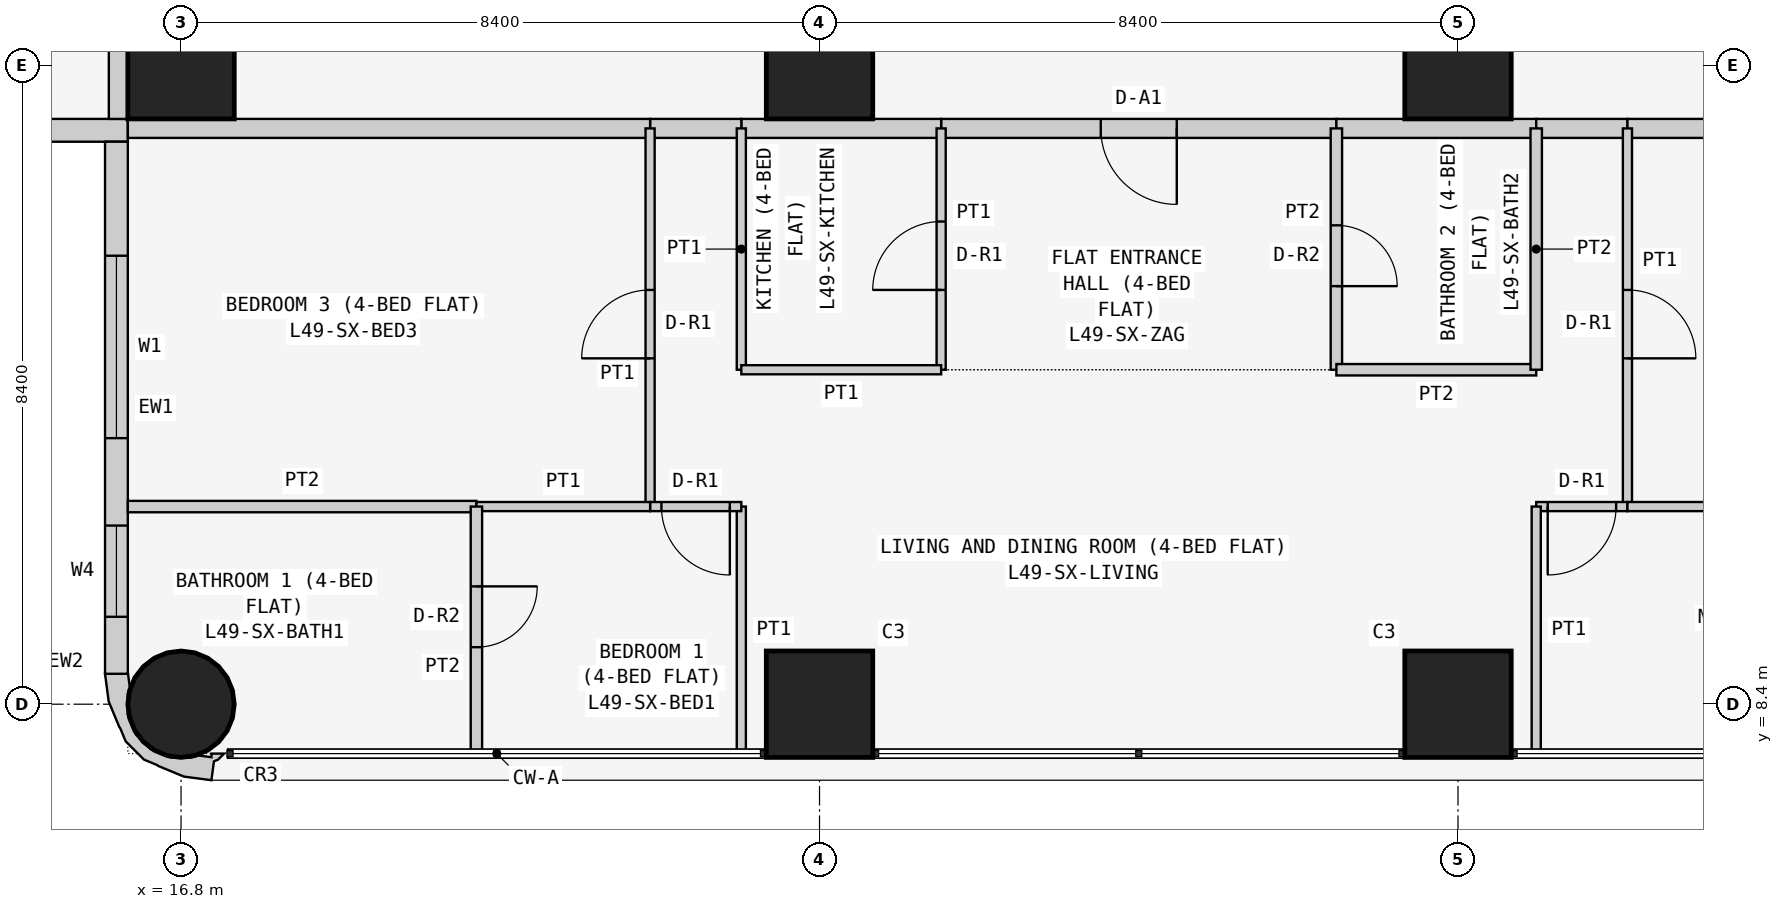
"""IFC4 building model, lengths in metres.
Left out: names, types, materials, properties, quantities, classifications, styles, units other than length and angle.
Written with IfcOpenShell. Run it as: python <this file> out.ifc"""

import sys

from ifc_helpers import new_model, si_unit, direction, frame, frame_2d, origin, origin_2d, place, context, subcontext, project, spatial, polyline, rectangle, circle, outline, extrude, element, fill, save


model = new_model("IFC4")
c1 = context("Model", 3, precision=1e-05, world=origin(), true_north=direction((0.0, 1.0)))
c2 = subcontext(c1, "Body", "Model", "MODEL_VIEW")
j1 = project(units=[si_unit("LENGTHUNIT", "METRE"), si_unit("PLANEANGLEUNIT", "RADIAN")], contexts=[c1])
p1 = place(None, origin())
s1 = spatial("IfcSite", under=j1, at=p1, CompositionType="ELEMENT")
p2 = place(p1, origin())
s2 = spatial("IfcBuilding", under=s1, at=p2, CompositionType="ELEMENT")
p3 = place(p2, frame((0.0, 0.0, 190.5)))
s3 = spatial("IfcBuildingStorey", under=s2, at=p3, CompositionType="ELEMENT", Elevation=190.5)
p4 = place(p3, frame((16.8, 8.4, 0.0), z_axis=(0.0, 0.0, 1.0), x_axis=(1.0, 0.0, 0.0)))
e1 = element("IfcColumn", 1, at=p4, inside=s3, PredefinedType="COLUMN", context=c2, shape_type="SweptSolid", body=[
    extrude(circle(Radius=0.7, at=origin_2d()), origin(), (0.0, 0.0, 1.0), 3.6),
])
for number, where, z_axis, x_axis in (
    (2, (16.8, 16.8, 0.0), (0.0, 0.0, 1.0), (1.0, 0.0, 0.0)),
    (3, (25.2, 8.4, 0.0), (0.0, 0.0, 1.0), (1.0, 0.0, 0.0)),
    (4, (25.2, 16.8, 0.0), (0.0, 0.0, 1.0), (1.0, 0.0, 0.0)),
    (5, (33.6, 8.4, 0.0), (0.0, 0.0, 1.0), (1.0, 0.0, 0.0)),
    (6, (33.6, 16.8, 0.0), (0.0, 0.0, 1.0), (1.0, 0.0, 0.0)),
):
    element("IfcColumn", number, at=place(p3, frame(where, z_axis=z_axis, x_axis=x_axis)), inside=s3, PredefinedType="COLUMN", context=c2, shape_type="SweptSolid", body=[
        extrude(rectangle(XDim=1.4, YDim=1.4, at=origin_2d()), origin(), (0.0, 0.0, 1.0), 3.6),
    ])
p5 = place(p3, frame((0.4, 15.95, 0.0), z_axis=(0.0, 0.0, 1.0), x_axis=(1.0, 0.0, 0.0)))
e7 = element("IfcWall", 7, at=p5, inside=s3, PredefinedType="SOLIDWALL", context=c2, shape_type="SweptSolid", body=[
    extrude(rectangle(XDim=15.7, YDim=0.3, at=frame_2d((7.85, 0.0))), origin(), (0.0, 0.0, 1.0), 3.45),
])
p6 = place(p5, frame((12.4, 0.0, 0.9)))
e8 = element("IfcOpeningElement", 8, at=p6, cuts=e7, PredefinedType="OPENING", context=c2, shape_type="SweptSolid", body=[
    extrude(rectangle(XDim=1.8, YDim=1.5, at=frame_2d((0.9, 0.75))), frame((0.0, 0.16, 0.0), z_axis=(0.0, -1.0, 0.0), x_axis=(1.0, 0.0, 0.0)), (0.0, 0.0, 1.0), 0.32),
])
p7 = place(p5, frame((9.55, 0.0, 1.5)))
e9 = element("IfcOpeningElement", 9, at=p7, cuts=e7, PredefinedType="OPENING", context=c2, shape_type="SweptSolid", body=[
    extrude(rectangle(XDim=0.9, YDim=0.7, at=frame_2d((0.45, 0.35))), frame((0.0, 0.16, 0.0), z_axis=(0.0, -1.0, 0.0), x_axis=(1.0, 0.0, 0.0)), (0.0, 0.0, 1.0), 0.32),
])
p8 = place(p5, frame((5.1, 0.0, 0.9)))
e10 = element("IfcOpeningElement", 10, at=p8, cuts=e7, PredefinedType="OPENING", context=c2, shape_type="SweptSolid", body=[
    extrude(rectangle(XDim=1.8, YDim=1.5, at=frame_2d((0.9, 0.75))), frame((0.0, 0.16, 0.0), z_axis=(0.0, -1.0, 0.0), x_axis=(1.0, 0.0, 0.0)), (0.0, 0.0, 1.0), 0.32),
])
p9 = place(p5, frame((2.0, 0.0, 0.0)))
e11 = element("IfcOpeningElement", 11, at=p9, cuts=e7, PredefinedType="OPENING", context=c2, shape_type="SweptSolid", body=[
    extrude(rectangle(XDim=0.9, YDim=2.4, at=frame_2d((0.45, 1.2))), frame((0.0, 0.16, 0.0), z_axis=(0.0, -1.0, 0.0), x_axis=(1.0, 0.0, 0.0)), (0.0, 0.0, 1.0), 0.32),
])
p10 = place(p5, frame((0.7, 0.0, 0.9)))
e12 = element("IfcOpeningElement", 12, at=p10, cuts=e7, PredefinedType="OPENING", context=c2, shape_type="SweptSolid", body=[
    extrude(rectangle(XDim=1.2, YDim=1.5, at=frame_2d((0.6, 0.75))), frame((0.0, 0.16, 0.0), z_axis=(0.0, -1.0, 0.0), x_axis=(1.0, 0.0, 0.0)), (0.0, 0.0, 1.0), 0.32),
])
p11 = place(p3, frame((15.95, 15.8, 0.0), z_axis=(0.0, 0.0, 1.0), x_axis=(0.0, -1.0, 0.0)))
e13 = element("IfcWall", 13, at=p11, inside=s3, PredefinedType="SOLIDWALL", context=c2, shape_type="SweptSolid", body=[
    extrude(rectangle(XDim=7.0, YDim=0.3, at=frame_2d((3.5, 0.0))), origin(), (0.0, 0.0, 1.0), 3.45),
])
p12 = place(p11, frame((1.5, 0.0, 0.9)))
e14 = element("IfcOpeningElement", 14, at=p12, cuts=e13, PredefinedType="OPENING", context=c2, shape_type="SweptSolid", body=[
    extrude(rectangle(XDim=2.4, YDim=1.5, at=frame_2d((1.2, 0.75))), frame((0.0, 0.16, 0.0), z_axis=(0.0, -1.0, 0.0), x_axis=(1.0, 0.0, 0.0)), (0.0, 0.0, 1.0), 0.32),
])
p13 = place(p11, frame((5.05, 0.0, 0.9)))
e15 = element("IfcOpeningElement", 15, at=p13, cuts=e13, PredefinedType="OPENING", context=c2, shape_type="SweptSolid", body=[
    extrude(rectangle(XDim=1.2, YDim=1.5, at=frame_2d((0.6, 0.75))), frame((0.0, 0.16, 0.0), z_axis=(0.0, -1.0, 0.0), x_axis=(1.0, 0.0, 0.0)), (0.0, 0.0, 1.0), 0.32),
])
p14 = place(p3, frame((16.076, 8.69, 0.0), z_axis=(0.0, 0.0, 1.0), x_axis=(-0.439933741929, -0.898030234854, 0.0)))
e16 = element("IfcWall", 16, at=p14, inside=s3, PredefinedType="SOLIDWALL", context=c2, shape_type="SweptSolid", body=[
    extrude(outline(polyline([(0.664, 1.577), (0.426, 1.497), (0.382, 1.536), (0.276, 1.572), (0.349, 1.423), (0.392, 1.444), (0.453, 1.261), (0.51, 1.211), (0.632, 0.961), (0.65, 0.683), (0.56, 0.419), (0.375, 0.21), (0.125, 0.087), (0.05, 0.082), (-0.127, -0.035), (-0.145, -0.044), (0.022, -0.296), (0.327, -0.094), (0.568, 0.18), (0.578, 0.199), (0.7, 0.337), (0.811, 0.661), (0.799, 0.846), (0.803, 0.866), (0.78, 1.231), (0.664, 1.577)])), origin(), (0.0, 0.0, 1.0), 3.45),
])
p15 = place(p3, frame((32.0, 15.975, 0.0), z_axis=(0.0, 0.0, 1.0), x_axis=(-1.0, 0.0, 0.0)))
e17 = element("IfcWall", 17, at=p15, inside=s3, PredefinedType="PARTITIONING", context=c2, shape_type="SweptSolid", body=[
    extrude(rectangle(XDim=5.2, YDim=0.25, at=frame_2d((2.6, 0.0))), origin(), (0.0, 0.0, 1.0), 3.45),
])
p16 = place(p15, frame((2.1, 0.0, 0.0)))
e18 = element("IfcOpeningElement", 18, at=p16, cuts=e17, PredefinedType="OPENING", context=c2, shape_type="SweptSolid", body=[
    extrude(rectangle(XDim=1.0, YDim=2.1, at=frame_2d((0.5, 1.05))), frame((0.0, 0.135, 0.0), z_axis=(0.0, -1.0, 0.0), x_axis=(1.0, 0.0, 0.0)), (0.0, 0.0, 1.0), 0.27),
])
p17 = place(p3, frame((34.629, 15.975, 0.0), z_axis=(0.0, 0.0, 1.0), x_axis=(-1.0, 0.0, 0.0)))
e19 = element("IfcWall", 19, at=p17, inside=s3, PredefinedType="PARTITIONING", context=c2, shape_type="SweptSolid", body=[
    extrude(rectangle(XDim=2.629, YDim=0.25, at=frame_2d((1.314, 0.0))), origin(), (0.0, 0.0, 1.0), 3.45),
])
p18 = place(p3, frame((26.8, 15.975, 0.0), z_axis=(0.0, 0.0, 1.0), x_axis=(-1.0, 0.0, 0.0)))
e20 = element("IfcWall", 20, at=p18, inside=s3, PredefinedType="PARTITIONING", context=c2, shape_type="SweptSolid", body=[
    extrude(rectangle(XDim=2.629, YDim=0.25, at=frame_2d((1.314, 0.0))), origin(), (0.0, 0.0, 1.0), 3.45),
])
p19 = place(p3, frame((24.171, 15.975, 0.0), z_axis=(0.0, 0.0, 1.0), x_axis=(-1.0, 0.0, 0.0)))
e21 = element("IfcWall", 21, at=p19, inside=s3, PredefinedType="PARTITIONING", context=c2, shape_type="SweptSolid", body=[
    extrude(rectangle(XDim=1.2, YDim=0.25, at=frame_2d((0.6, 0.0))), origin(), (0.0, 0.0, 1.0), 3.45),
])
p20 = place(p3, frame((35.829, 15.975, 0.0), z_axis=(0.0, 0.0, 1.0), x_axis=(-1.0, 0.0, 0.0)))
e22 = element("IfcWall", 22, at=p20, inside=s3, PredefinedType="PARTITIONING", context=c2, shape_type="SweptSolid", body=[
    extrude(rectangle(XDim=1.2, YDim=0.25, at=frame_2d((0.6, 0.0))), origin(), (0.0, 0.0, 1.0), 3.45),
])
for number, where, z_axis, x_axis in (
    (23, (42.7, 15.975, 0.0), (0.0, 0.0, 1.0), (-1.0, 0.0, 0.0)),
    (24, (22.971, 15.975, 0.0), (0.0, 0.0, 1.0), (-1.0, 0.0, 0.0)),
    (25, (15.975, 16.1, 0.0), (0.0, 0.0, 1.0), (0.0, 1.0, 0.0)),
):
    element("IfcWall", number, at=place(p3, frame(where, z_axis=z_axis, x_axis=x_axis)), inside=s3, PredefinedType="PARTITIONING", context=c2, shape_type="SweptSolid", body=[
        extrude(rectangle(XDim=6.871, YDim=0.25, at=frame_2d((3.436, 0.0))), origin(), (0.0, 0.0, 1.0), 3.45),
    ])
p21 = place(p3, frame((32.0, 12.8, 0.0), z_axis=(0.0, 0.0, 1.0), x_axis=(0.0, 1.0, 0.0)))
e26 = element("IfcWall", 26, at=p21, inside=s3, PredefinedType="PARTITIONING", context=c2, shape_type="SweptSolid", body=[
    extrude(rectangle(XDim=3.175, YDim=0.15, at=frame_2d((1.587, 0.0))), origin(), (0.0, 0.0, 1.0), 3.45),
])
p22 = place(p21, frame((1.1, 0.0, 0.0)))
e27 = element("IfcOpeningElement", 27, at=p22, cuts=e26, PredefinedType="OPENING", context=c2, shape_type="SweptSolid", body=[
    extrude(rectangle(XDim=0.8, YDim=2.1, at=frame_2d((0.4, 1.05))), frame((0.0, 0.085, 0.0), z_axis=(0.0, -1.0, 0.0), x_axis=(1.0, 0.0, 0.0)), (0.0, 0.0, 1.0), 0.17),
])
p23 = place(p3, frame((26.8, 15.975, 0.0), z_axis=(0.0, 0.0, 1.0), x_axis=(0.0, -1.0, 0.0)))
e28 = element("IfcWall", 28, at=p23, inside=s3, PredefinedType="PARTITIONING", context=c2, shape_type="SweptSolid", body=[
    extrude(rectangle(XDim=3.175, YDim=0.12, at=frame_2d((1.587, 0.0))), origin(), (0.0, 0.0, 1.0), 3.45),
])
p24 = place(p23, frame((1.225, 0.0, 0.0)))
e29 = element("IfcOpeningElement", 29, at=p24, cuts=e28, PredefinedType="OPENING", context=c2, shape_type="SweptSolid", body=[
    extrude(rectangle(XDim=0.9, YDim=2.1, at=frame_2d((0.45, 1.05))), frame((0.0, 0.07, 0.0), z_axis=(0.0, -1.0, 0.0), x_axis=(1.0, 0.0, 0.0)), (0.0, 0.0, 1.0), 0.14),
])
p25 = place(p3, frame((32.0, 12.8, 0.0), z_axis=(0.0, 0.0, 1.0), x_axis=(1.0, 0.0, 0.0)))
e30 = element("IfcWall", 30, at=p25, inside=s3, PredefinedType="PARTITIONING", context=c2, shape_type="SweptSolid", body=[
    extrude(rectangle(XDim=2.629, YDim=0.15, at=frame_2d((1.314, 0.0))), origin(), (0.0, 0.0, 1.0), 3.45),
])
p26 = place(p3, frame((34.629, 12.8, 0.0), z_axis=(0.0, 0.0, 1.0), x_axis=(0.0, 1.0, 0.0)))
e31 = element("IfcWall", 31, at=p26, inside=s3, PredefinedType="PARTITIONING", context=c2, shape_type="SweptSolid", body=[
    extrude(rectangle(XDim=3.175, YDim=0.15, at=frame_2d((1.587, 0.0))), origin(), (0.0, 0.0, 1.0), 3.45),
])
p27 = place(p3, frame((24.171, 15.975, 0.0), z_axis=(0.0, 0.0, 1.0), x_axis=(0.0, -1.0, 0.0)))
e32 = element("IfcWall", 32, at=p27, inside=s3, PredefinedType="PARTITIONING", context=c2, shape_type="SweptSolid", body=[
    extrude(rectangle(XDim=3.175, YDim=0.12, at=frame_2d((1.587, 0.0))), origin(), (0.0, 0.0, 1.0), 3.45),
])
p28 = place(p3, frame((24.171, 12.8, 0.0), z_axis=(0.0, 0.0, 1.0), x_axis=(1.0, 0.0, 0.0)))
e33 = element("IfcWall", 33, at=p28, inside=s3, PredefinedType="PARTITIONING", context=c2, shape_type="SweptSolid", body=[
    extrude(rectangle(XDim=2.629, YDim=0.12, at=frame_2d((1.314, 0.0))), origin(), (0.0, 0.0, 1.0), 3.45),
])
p29 = place(p3, frame((35.829, 15.975, 0.0), z_axis=(0.0, 0.0, 1.0), x_axis=(0.0, -1.0, 0.0)))
e34 = element("IfcWall", 34, at=p29, inside=s3, PredefinedType="PARTITIONING", context=c2, shape_type="SweptSolid", body=[
    extrude(rectangle(XDim=4.975, YDim=0.12, at=frame_2d((2.488, 0.0))), origin(), (0.0, 0.0, 1.0), 3.45),
])
p30 = place(p29, frame((2.125, 0.0, 0.0)))
e35 = element("IfcOpeningElement", 35, at=p30, cuts=e34, PredefinedType="OPENING", context=c2, shape_type="SweptSolid", body=[
    extrude(rectangle(XDim=0.9, YDim=2.1, at=frame_2d((0.45, 1.05))), frame((0.0, 0.07, 0.0), z_axis=(0.0, -1.0, 0.0), x_axis=(1.0, 0.0, 0.0)), (0.0, 0.0, 1.0), 0.14),
])
p31 = place(p3, frame((35.829, 11.0, 0.0), z_axis=(0.0, 0.0, 1.0), x_axis=(-1.0, 0.0, 0.0)))
e36 = element("IfcWall", 36, at=p31, inside=s3, PredefinedType="PARTITIONING", context=c2, shape_type="SweptSolid", body=[
    extrude(rectangle(XDim=1.2, YDim=0.12, at=frame_2d((0.6, 0.0))), origin(), (0.0, 0.0, 1.0), 3.45),
])
p32 = place(p31, frame((0.149, 0.0, 0.0)))
e37 = element("IfcOpeningElement", 37, at=p32, cuts=e36, PredefinedType="OPENING", context=c2, shape_type="SweptSolid", body=[
    extrude(rectangle(XDim=0.9, YDim=2.1, at=frame_2d((0.45, 1.05))), frame((0.0, 0.07, 0.0), z_axis=(0.0, -1.0, 0.0), x_axis=(1.0, 0.0, 0.0)), (0.0, 0.0, 1.0), 0.14),
])
p33 = place(p3, frame((34.629, 11.0, 0.0), z_axis=(0.0, 0.0, 1.0), x_axis=(0.0, -1.0, 0.0)))
e38 = element("IfcWall", 38, at=p33, inside=s3, PredefinedType="PARTITIONING", context=c2, shape_type="SweptSolid", body=[
    extrude(rectangle(XDim=3.25, YDim=0.12, at=frame_2d((1.625, 0.0))), origin(), (0.0, 0.0, 1.0), 3.45),
])
p34 = place(p3, frame((22.971, 11.0, 0.0), z_axis=(0.0, 0.0, 1.0), x_axis=(0.0, 1.0, 0.0)))
e39 = element("IfcWall", 39, at=p34, inside=s3, PredefinedType="PARTITIONING", context=c2, shape_type="SweptSolid", body=[
    extrude(rectangle(XDim=4.975, YDim=0.12, at=frame_2d((2.488, 0.0))), origin(), (0.0, 0.0, 1.0), 3.45),
])
p35 = place(p34, frame((1.95, 0.0, 0.0)))
e40 = element("IfcOpeningElement", 40, at=p35, cuts=e39, PredefinedType="OPENING", context=c2, shape_type="SweptSolid", body=[
    extrude(rectangle(XDim=0.9, YDim=2.1, at=frame_2d((0.45, 1.05))), frame((0.0, 0.07, 0.0), z_axis=(0.0, -1.0, 0.0), x_axis=(1.0, 0.0, 0.0)), (0.0, 0.0, 1.0), 0.14),
])
p36 = place(p3, frame((24.171, 7.75, 0.0), z_axis=(0.0, 0.0, 1.0), x_axis=(0.0, 1.0, 0.0)))
e41 = element("IfcWall", 41, at=p36, inside=s3, PredefinedType="PARTITIONING", context=c2, shape_type="SweptSolid", body=[
    extrude(rectangle(XDim=3.25, YDim=0.12, at=frame_2d((1.625, 0.0))), origin(), (0.0, 0.0, 1.0), 3.45),
])
p37 = place(p3, frame((24.171, 11.0, 0.0), z_axis=(0.0, 0.0, 1.0), x_axis=(-1.0, 0.0, 0.0)))
e42 = element("IfcWall", 42, at=p37, inside=s3, PredefinedType="PARTITIONING", context=c2, shape_type="SweptSolid", body=[
    extrude(rectangle(XDim=1.2, YDim=0.12, at=frame_2d((0.6, 0.0))), origin(), (0.0, 0.0, 1.0), 3.45),
])
p38 = place(p37, frame((0.151, 0.0, 0.0)))
e43 = element("IfcOpeningElement", 43, at=p38, cuts=e42, PredefinedType="OPENING", context=c2, shape_type="SweptSolid", body=[
    extrude(rectangle(XDim=0.9, YDim=2.1, at=frame_2d((0.45, 1.05))), frame((0.0, 0.07, 0.0), z_axis=(0.0, -1.0, 0.0), x_axis=(1.0, 0.0, 0.0)), (0.0, 0.0, 1.0), 0.14),
])
p39 = place(p3, frame((35.829, 11.0, 0.0), z_axis=(0.0, 0.0, 1.0), x_axis=(1.0, 0.0, 0.0)))
e44 = element("IfcWall", 44, at=p39, inside=s3, PredefinedType="PARTITIONING", context=c2, shape_type="SweptSolid", body=[
    extrude(rectangle(XDim=6.871, YDim=0.12, at=frame_2d((3.436, 0.0))), origin(), (0.0, 0.0, 1.0), 3.45),
])
p40 = place(p3, frame((16.1, 11.0, 0.0), z_axis=(0.0, 0.0, 1.0), x_axis=(1.0, 0.0, 0.0)))
e45 = element("IfcWall", 45, at=p40, inside=s3, PredefinedType="PARTITIONING", context=c2, shape_type="SweptSolid", body=[
    extrude(rectangle(XDim=4.586, YDim=0.15, at=frame_2d((2.293, 0.0))), origin(), (0.0, 0.0, 1.0), 3.45),
])
p41 = place(p3, frame((20.686, 11.0, 0.0), z_axis=(0.0, 0.0, 1.0), x_axis=(1.0, 0.0, 0.0)))
e46 = element("IfcWall", 46, at=p41, inside=s3, PredefinedType="PARTITIONING", context=c2, shape_type="SweptSolid", body=[
    extrude(rectangle(XDim=2.285, YDim=0.12, at=frame_2d((1.143, 0.0))), origin(), (0.0, 0.0, 1.0), 3.45),
])
p42 = place(p3, frame((20.686, 7.75, 0.0), z_axis=(0.0, 0.0, 1.0), x_axis=(0.0, 1.0, 0.0)))
e47 = element("IfcWall", 47, at=p42, inside=s3, PredefinedType="PARTITIONING", context=c2, shape_type="SweptSolid", body=[
    extrude(rectangle(XDim=3.25, YDim=0.15, at=frame_2d((1.625, 0.0))), origin(), (0.0, 0.0, 1.0), 3.45),
])
p43 = place(p42, frame((1.4, 0.0, 0.0)))
e48 = element("IfcOpeningElement", 48, at=p43, cuts=e47, PredefinedType="OPENING", context=c2, shape_type="SweptSolid", body=[
    extrude(rectangle(XDim=0.8, YDim=2.1, at=frame_2d((0.4, 1.05))), frame((0.0, 0.085, 0.0), z_axis=(0.0, -1.0, 0.0), x_axis=(1.0, 0.0, 0.0)), (0.0, 0.0, 1.0), 0.17),
])
p44 = place(p12, origin())
e49 = element("IfcWindow", 49, at=p44, inside=s3, PartitioningType="SINGLE_PANEL", PredefinedType="WINDOW", context=c2, shape_type="SweptSolid", body=[
    extrude(rectangle(XDim=2.4, YDim=1.5, at=frame_2d((1.2, 0.75))), frame((0.0, 0.03, 0.0), z_axis=(0.0, -1.0, 0.0), x_axis=(1.0, 0.0, 0.0)), (0.0, 0.0, 1.0), 0.06),
])
fill(e14, e49)
p45 = place(p13, origin())
e50 = element("IfcWindow", 50, at=p45, inside=s3, PartitioningType="SINGLE_PANEL", PredefinedType="WINDOW", context=c2, shape_type="SweptSolid", body=[
    extrude(rectangle(XDim=1.2, YDim=1.5, at=frame_2d((0.6, 0.75))), frame((0.0, 0.03, 0.0), z_axis=(0.0, -1.0, 0.0), x_axis=(1.0, 0.0, 0.0)), (0.0, 0.0, 1.0), 0.06),
])
fill(e15, e50)
p46 = place(p16, origin())
e51 = element("IfcDoor", 51, at=p46, inside=s3, OperationType="SINGLE_SWING_LEFT", PredefinedType="DOOR", context=c2, shape_type="SweptSolid", body=[
    extrude(rectangle(XDim=1.0, YDim=2.1, at=frame_2d((0.5, 1.05))), frame((0.0, 0.025, 0.0), z_axis=(0.0, -1.0, 0.0), x_axis=(1.0, 0.0, 0.0)), (0.0, 0.0, 1.0), 0.05),
])
fill(e18, e51)
p47 = place(p22, frame((0.8, 0.0, 0.0), z_axis=(0.0, 0.0, 1.0), x_axis=(-1.0, 0.0, 0.0)))
e52 = element("IfcDoor", 52, at=p47, inside=s3, OperationType="SINGLE_SWING_RIGHT", PredefinedType="DOOR", context=c2, shape_type="SweptSolid", body=[
    extrude(rectangle(XDim=0.8, YDim=2.1, at=frame_2d((0.4, 1.05))), frame((0.0, 0.025, 0.0), z_axis=(0.0, -1.0, 0.0), x_axis=(1.0, 0.0, 0.0)), (0.0, 0.0, 1.0), 0.05),
])
fill(e27, e52)
p48 = place(p24, frame((0.9, 0.0, 0.0), z_axis=(0.0, 0.0, 1.0), x_axis=(-1.0, 0.0, 0.0)))
e53 = element("IfcDoor", 53, at=p48, inside=s3, OperationType="SINGLE_SWING_LEFT", PredefinedType="DOOR", context=c2, shape_type="SweptSolid", body=[
    extrude(rectangle(XDim=0.9, YDim=2.1, at=frame_2d((0.45, 1.05))), frame((0.0, 0.025, 0.0), z_axis=(0.0, -1.0, 0.0), x_axis=(1.0, 0.0, 0.0)), (0.0, 0.0, 1.0), 0.05),
])
fill(e29, e53)
p49 = place(p30, origin())
e54 = element("IfcDoor", 54, at=p49, inside=s3, OperationType="SINGLE_SWING_RIGHT", PredefinedType="DOOR", context=c2, shape_type="SweptSolid", body=[
    extrude(rectangle(XDim=0.9, YDim=2.1, at=frame_2d((0.45, 1.05))), frame((0.0, 0.025, 0.0), z_axis=(0.0, -1.0, 0.0), x_axis=(1.0, 0.0, 0.0)), (0.0, 0.0, 1.0), 0.05),
])
fill(e35, e54)
p50 = place(p32, origin())
e55 = element("IfcDoor", 55, at=p50, inside=s3, OperationType="SINGLE_SWING_RIGHT", PredefinedType="DOOR", context=c2, shape_type="SweptSolid", body=[
    extrude(rectangle(XDim=0.9, YDim=2.1, at=frame_2d((0.45, 1.05))), frame((0.0, 0.025, 0.0), z_axis=(0.0, -1.0, 0.0), x_axis=(1.0, 0.0, 0.0)), (0.0, 0.0, 1.0), 0.05),
])
fill(e37, e55)
p51 = place(p35, origin())
e56 = element("IfcDoor", 56, at=p51, inside=s3, OperationType="SINGLE_SWING_LEFT", PredefinedType="DOOR", context=c2, shape_type="SweptSolid", body=[
    extrude(rectangle(XDim=0.9, YDim=2.1, at=frame_2d((0.45, 1.05))), frame((0.0, 0.025, 0.0), z_axis=(0.0, -1.0, 0.0), x_axis=(1.0, 0.0, 0.0)), (0.0, 0.0, 1.0), 0.05),
])
fill(e40, e56)
p52 = place(p38, origin())
e57 = element("IfcDoor", 57, at=p52, inside=s3, OperationType="SINGLE_SWING_LEFT", PredefinedType="DOOR", context=c2, shape_type="SweptSolid", body=[
    extrude(rectangle(XDim=0.9, YDim=2.1, at=frame_2d((0.45, 1.05))), frame((0.0, 0.025, 0.0), z_axis=(0.0, -1.0, 0.0), x_axis=(1.0, 0.0, 0.0)), (0.0, 0.0, 1.0), 0.05),
])
fill(e43, e57)
p53 = place(p43, frame((0.8, 0.0, 0.0), z_axis=(0.0, 0.0, 1.0), x_axis=(-1.0, 0.0, 0.0)))
e58 = element("IfcDoor", 58, at=p53, inside=s3, OperationType="SINGLE_SWING_LEFT", PredefinedType="DOOR", context=c2, shape_type="SweptSolid", body=[
    extrude(rectangle(XDim=0.8, YDim=2.1, at=frame_2d((0.4, 1.05))), frame((0.0, 0.025, 0.0), z_axis=(0.0, -1.0, 0.0), x_axis=(1.0, 0.0, 0.0)), (0.0, 0.0, 1.0), 0.05),
])
fill(e48, e58)
save(model, sys.argv[1])
